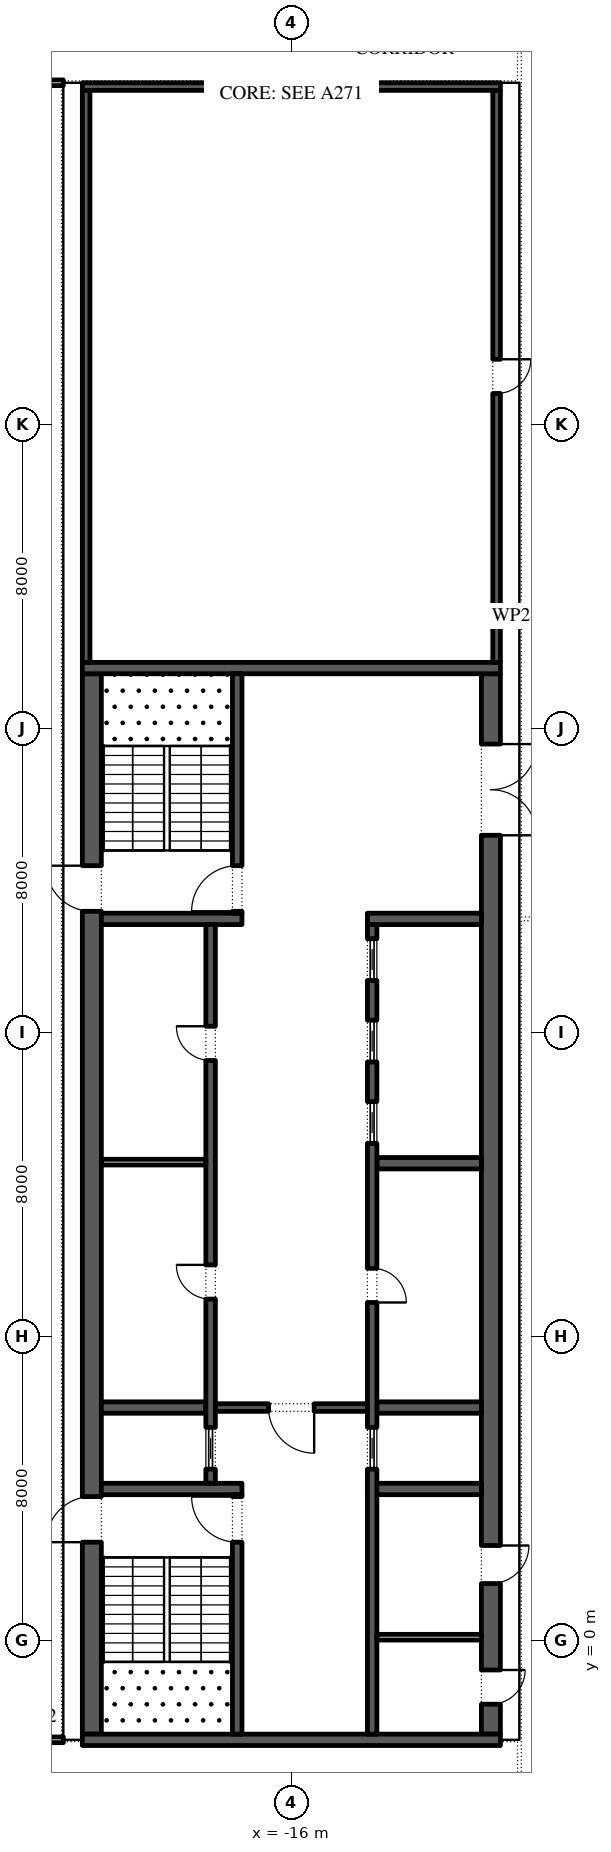
"""IFC4 building model, lengths in metres.
Left out: names, types, materials, properties, quantities, classifications, styles, units other than length and angle.
Written with IfcOpenShell. Run it as: python <this file> out.ifc"""

import sys

from ifc_helpers import new_model, si_unit, direction, frame, frame_2d, origin, place, context, subcontext, project, spatial, rectangle, extrude, element, fill, save


model = new_model("IFC4")
c1 = context("Model", 3, precision=1e-05, world=origin(), true_north=direction((0.0, 1.0)))
c2 = subcontext(c1, "Body", "Model", "MODEL_VIEW")
j1 = project(units=[si_unit("LENGTHUNIT", "METRE"), si_unit("PLANEANGLEUNIT", "RADIAN")], contexts=[c1])
p1 = place(None, origin())
s1 = spatial("IfcSite", under=j1, at=p1, CompositionType="ELEMENT")
p2 = place(p1, origin())
s2 = spatial("IfcBuilding", under=s1, at=p2, CompositionType="ELEMENT")
p3 = place(p2, frame((0.0, 0.0, 313.2)))
s3 = spatial("IfcBuildingStorey", under=s2, at=p3, CompositionType="ELEMENT", Elevation=313.2)
p4 = place(p3, frame((-21.25, -2.45, 0.0), z_axis=(0.0, 0.0, 1.0), x_axis=(0.0, 1.0, 0.0)))
e1 = element("IfcWall", 1, at=p4, inside=s3, PredefinedType="SHEAR", context=c2, shape_type="SweptSolid", body=[
    extrude(rectangle(XDim=27.9, YDim=0.5, at=frame_2d((13.95, 0.0))), origin(), (0.0, 0.0, 1.0), 4.0),
])
p5 = place(p4, frame((5.05, 0.0, 0.0)))
e2 = element("IfcOpeningElement", 2, at=p5, cuts=e1, PredefinedType="OPENING", context=c2, shape_type="SweptSolid", body=[
    extrude(rectangle(XDim=1.2, YDim=2.1, at=frame_2d((0.6, 1.05))), frame((0.0, 0.26, 0.0), z_axis=(0.0, -1.0, 0.0), x_axis=(1.0, 0.0, 0.0)), (0.0, 0.0, 1.0), 0.52),
])
p6 = place(p4, frame((21.65, 0.0, 0.0)))
e3 = element("IfcOpeningElement", 3, at=p6, cuts=e1, PredefinedType="OPENING", context=c2, shape_type="SweptSolid", body=[
    extrude(rectangle(XDim=1.2, YDim=2.1, at=frame_2d((0.6, 1.05))), frame((0.0, 0.26, 0.0), z_axis=(0.0, -1.0, 0.0), x_axis=(1.0, 0.0, 0.0)), (0.0, 0.0, 1.0), 0.52),
])
p7 = place(p3, frame((-10.75, -2.45, 0.0), z_axis=(0.0, 0.0, 1.0), x_axis=(0.0, 1.0, 0.0)))
e4 = element("IfcWall", 4, at=p7, inside=s3, PredefinedType="SHEAR", context=c2, shape_type="SweptSolid", body=[
    extrude(rectangle(XDim=27.9, YDim=0.5, at=frame_2d((13.95, 0.0))), origin(), (0.0, 0.0, 1.0), 4.0),
])
p8 = place(p7, frame((23.65, 0.0, 0.0)))
e5 = element("IfcOpeningElement", 5, at=p8, cuts=e4, PredefinedType="OPENING", context=c2, shape_type="SweptSolid", body=[
    extrude(rectangle(XDim=2.4, YDim=2.1, at=frame_2d((1.2, 1.05))), frame((0.0, 0.26, 0.0), z_axis=(0.0, -1.0, 0.0), x_axis=(1.0, 0.0, 0.0)), (0.0, 0.0, 1.0), 0.52),
])
p9 = place(p7, frame((0.788, 0.0, 0.0)))
e6 = element("IfcOpeningElement", 6, at=p9, cuts=e4, PredefinedType="OPENING", context=c2, shape_type="SweptSolid", body=[
    extrude(rectangle(XDim=0.9, YDim=2.1, at=frame_2d((0.45, 1.05))), frame((0.0, 0.26, 0.0), z_axis=(0.0, -1.0, 0.0), x_axis=(1.0, 0.0, 0.0)), (0.0, 0.0, 1.0), 0.52),
])
p10 = place(p7, frame((3.962, 0.0, 0.0)))
e7 = element("IfcOpeningElement", 7, at=p10, cuts=e4, PredefinedType="OPENING", context=c2, shape_type="SweptSolid", body=[
    extrude(rectangle(XDim=1.0, YDim=2.1, at=frame_2d((0.5, 1.05))), frame((0.0, 0.26, 0.0), z_axis=(0.0, -1.0, 0.0), x_axis=(1.0, 0.0, 0.0)), (0.0, 0.0, 1.0), 0.52),
])
for number, where, z_axis, x_axis in (
    (8, (-21.5, -2.6, 0.0), (0.0, 0.0, 1.0), (1.0, 0.0, 0.0)),
    (9, (-21.5, 25.6, 0.0), (0.0, 0.0, 1.0), (1.0, 0.0, 0.0)),
):
    element("IfcWall", number, at=place(p3, frame(where, z_axis=z_axis, x_axis=x_axis)), inside=s3, PredefinedType="SHEAR", context=c2, shape_type="SweptSolid", body=[
        extrude(rectangle(XDim=11.0, YDim=0.3, at=frame_2d((5.5, 0.0))), origin(), (0.0, 0.0, 1.0), 4.0),
    ])
p11 = place(p3, frame((-21.0, 4.0, 0.0), z_axis=(0.0, 0.0, 1.0), x_axis=(1.0, 0.0, 0.0)))
e10 = element("IfcWall", 10, at=p11, inside=s3, PredefinedType="SHEAR", context=c2, shape_type="SweptSolid", body=[
    extrude(rectangle(XDim=3.7, YDim=0.3, at=frame_2d((1.85, 0.0))), origin(), (0.0, 0.0, 1.0), 4.0),
])
p12 = place(p3, frame((-17.425, -2.45, 0.0), z_axis=(0.0, 0.0, 1.0), x_axis=(0.0, 1.0, 0.0)))
e11 = element("IfcWall", 11, at=p12, inside=s3, PredefinedType="SHEAR", context=c2, shape_type="SweptSolid", body=[
    extrude(rectangle(XDim=6.3, YDim=0.25, at=frame_2d((3.15, 0.0))), origin(), (0.0, 0.0, 1.0), 4.0),
])
p13 = place(p12, frame((5.05, 0.0, 0.0)))
e12 = element("IfcOpeningElement", 12, at=p13, cuts=e11, PredefinedType="OPENING", context=c2, shape_type="SweptSolid", body=[
    extrude(rectangle(XDim=1.2, YDim=2.1, at=frame_2d((0.6, 1.05))), frame((0.0, 0.135, 0.0), z_axis=(0.0, -1.0, 0.0), x_axis=(1.0, 0.0, 0.0)), (0.0, 0.0, 1.0), 0.27),
])
p14 = place(p3, frame((-21.0, 19.0, 0.0), z_axis=(0.0, 0.0, 1.0), x_axis=(1.0, 0.0, 0.0)))
e13 = element("IfcWall", 13, at=p14, inside=s3, PredefinedType="SHEAR", context=c2, shape_type="SweptSolid", body=[
    extrude(rectangle(XDim=3.7, YDim=0.3, at=frame_2d((1.85, 0.0))), origin(), (0.0, 0.0, 1.0), 4.0),
])
p15 = place(p3, frame((-17.425, 19.15, 0.0), z_axis=(0.0, 0.0, 1.0), x_axis=(0.0, 1.0, 0.0)))
e14 = element("IfcWall", 14, at=p15, inside=s3, PredefinedType="SHEAR", context=c2, shape_type="SweptSolid", body=[
    extrude(rectangle(XDim=6.3, YDim=0.25, at=frame_2d((3.15, 0.0))), origin(), (0.0, 0.0, 1.0), 4.0),
])
p16 = place(p15, frame((0.05, 0.0, 0.0)))
e15 = element("IfcOpeningElement", 15, at=p16, cuts=e14, PredefinedType="OPENING", context=c2, shape_type="SweptSolid", body=[
    extrude(rectangle(XDim=1.2, YDim=2.1, at=frame_2d((0.6, 1.05))), frame((0.0, 0.135, 0.0), z_axis=(0.0, -1.0, 0.0), x_axis=(1.0, 0.0, 0.0)), (0.0, 0.0, 1.0), 0.27),
])
p17 = place(p3, frame((-21.0, 6.143, 0.0), z_axis=(0.0, 0.0, 1.0), x_axis=(1.0, 0.0, 0.0)))
e16 = element("IfcWall", 16, at=p17, inside=s3, PredefinedType="SHEAR", context=c2, shape_type="SweptSolid", body=[
    extrude(rectangle(XDim=2.75, YDim=0.3, at=frame_2d((1.375, 0.0))), origin(), (0.0, 0.0, 1.0), 4.0),
])
p18 = place(p3, frame((-18.125, 4.15, 0.0), z_axis=(0.0, 0.0, 1.0), x_axis=(0.0, 1.0, 0.0)))
e17 = element("IfcWall", 17, at=p18, inside=s3, PredefinedType="SHEAR", context=c2, shape_type="SweptSolid", body=[
    extrude(rectangle(XDim=14.7, YDim=0.25, at=frame_2d((7.35, 0.0))), origin(), (0.0, 0.0, 1.0), 4.0),
])
p19 = place(p18, frame((4.846, 0.0, 0.0)))
e18 = element("IfcOpeningElement", 18, at=p19, cuts=e17, PredefinedType="OPENING", context=c2, shape_type="SweptSolid", body=[
    extrude(rectangle(XDim=0.9, YDim=2.1, at=frame_2d((0.45, 1.05))), frame((0.0, 0.135, 0.0), z_axis=(0.0, -1.0, 0.0), x_axis=(1.0, 0.0, 0.0)), (0.0, 0.0, 1.0), 0.27),
])
p20 = place(p18, frame((11.125, 0.0, 0.0)))
e19 = element("IfcOpeningElement", 19, at=p20, cuts=e17, PredefinedType="OPENING", context=c2, shape_type="SweptSolid", body=[
    extrude(rectangle(XDim=0.9, YDim=2.1, at=frame_2d((0.45, 1.05))), frame((0.0, 0.135, 0.0), z_axis=(0.0, -1.0, 0.0), x_axis=(1.0, 0.0, 0.0)), (0.0, 0.0, 1.0), 0.27),
])
p21 = place(p18, frame((0.371, 0.0, 0.0)))
e20 = element("IfcOpeningElement", 20, at=p21, cuts=e17, PredefinedType="OPENING", context=c2, shape_type="SweptSolid", body=[
    extrude(rectangle(XDim=1.1, YDim=2.1, at=frame_2d((0.55, 1.05))), frame((0.0, 0.135, 0.0), z_axis=(0.0, -1.0, 0.0), x_axis=(1.0, 0.0, 0.0)), (0.0, 0.0, 1.0), 0.27),
])
p22 = place(p3, frame((-21.0, 12.6, 0.0), z_axis=(0.0, 0.0, 1.0), x_axis=(1.0, 0.0, 0.0)))
e21 = element("IfcWall", 21, at=p22, inside=s3, PredefinedType="PARTITIONING", context=c2, shape_type="SweptSolid", body=[
    extrude(rectangle(XDim=2.75, YDim=0.15, at=frame_2d((1.375, 0.0))), origin(), (0.0, 0.0, 1.0), 4.0),
])
p23 = place(p3, frame((-14.0, 4.0, 0.0), z_axis=(0.0, 0.0, 1.0), x_axis=(1.0, 0.0, 0.0)))
e22 = element("IfcWall", 22, at=p23, inside=s3, PredefinedType="SHEAR", context=c2, shape_type="SweptSolid", body=[
    extrude(rectangle(XDim=3.0, YDim=0.3, at=frame_2d((1.5, 0.0))), origin(), (0.0, 0.0, 1.0), 4.0),
])
for number, where, z_axis, x_axis in (
    (23, (-13.75, 6.143, 0.0), (0.0, 0.0, 1.0), (1.0, 0.0, 0.0)),
    (24, (-13.75, 12.571, 0.0), (0.0, 0.0, 1.0), (1.0, 0.0, 0.0)),
):
    element("IfcWall", number, at=place(p3, frame(where, z_axis=z_axis, x_axis=x_axis)), inside=s3, PredefinedType="SHEAR", context=c2, shape_type="SweptSolid", body=[
        extrude(rectangle(XDim=2.75, YDim=0.3, at=frame_2d((1.375, 0.0))), origin(), (0.0, 0.0, 1.0), 4.0),
    ])
p24 = place(p3, frame((-14.0, 19.0, 0.0), z_axis=(0.0, 0.0, 1.0), x_axis=(1.0, 0.0, 0.0)))
e25 = element("IfcWall", 25, at=p24, inside=s3, PredefinedType="SHEAR", context=c2, shape_type="SweptSolid", body=[
    extrude(rectangle(XDim=3.0, YDim=0.3, at=frame_2d((1.5, 0.0))), origin(), (0.0, 0.0, 1.0), 4.0),
])
p25 = place(p3, frame((-13.875, -2.45, 0.0), z_axis=(0.0, 0.0, 1.0), x_axis=(0.0, 1.0, 0.0)))
e26 = element("IfcWall", 26, at=p25, inside=s3, PredefinedType="SHEAR", context=c2, shape_type="SweptSolid", body=[
    extrude(rectangle(XDim=21.3, YDim=0.25, at=frame_2d((10.65, 0.0))), origin(), (0.0, 0.0, 1.0), 4.0),
])
p26 = place(p25, frame((11.357, 0.0, 0.0)))
e27 = element("IfcOpeningElement", 27, at=p26, cuts=e26, PredefinedType="OPENING", context=c2, shape_type="SweptSolid", body=[
    extrude(rectangle(XDim=0.9, YDim=2.1, at=frame_2d((0.45, 1.05))), frame((0.0, 0.135, 0.0), z_axis=(0.0, -1.0, 0.0), x_axis=(1.0, 0.0, 0.0)), (0.0, 0.0, 1.0), 0.27),
])
p27 = place(p25, frame((6.971, 0.0, 0.0)))
e28 = element("IfcOpeningElement", 28, at=p27, cuts=e26, PredefinedType="OPENING", context=c2, shape_type="SweptSolid", body=[
    extrude(rectangle(XDim=1.1, YDim=2.1, at=frame_2d((0.55, 1.05))), frame((0.0, 0.135, 0.0), z_axis=(0.0, -1.0, 0.0), x_axis=(1.0, 0.0, 0.0)), (0.0, 0.0, 1.0), 0.27),
])
p28 = place(p25, frame((15.543, 0.0, 0.0)))
e29 = element("IfcOpeningElement", 29, at=p28, cuts=e26, PredefinedType="OPENING", context=c2, shape_type="SweptSolid", body=[
    extrude(rectangle(XDim=1.1, YDim=2.1, at=frame_2d((0.55, 1.05))), frame((0.0, 0.135, 0.0), z_axis=(0.0, -1.0, 0.0), x_axis=(1.0, 0.0, 0.0)), (0.0, 0.0, 1.0), 0.27),
])
p29 = place(p25, frame((17.686, 0.0, 0.0)))
e30 = element("IfcOpeningElement", 30, at=p29, cuts=e26, PredefinedType="OPENING", context=c2, shape_type="SweptSolid", body=[
    extrude(rectangle(XDim=1.1, YDim=2.1, at=frame_2d((0.55, 1.05))), frame((0.0, 0.135, 0.0), z_axis=(0.0, -1.0, 0.0), x_axis=(1.0, 0.0, 0.0)), (0.0, 0.0, 1.0), 0.27),
])
p30 = place(p25, frame((19.829, 0.0, 0.0)))
e31 = element("IfcOpeningElement", 31, at=p30, cuts=e26, PredefinedType="OPENING", context=c2, shape_type="SweptSolid", body=[
    extrude(rectangle(XDim=1.1, YDim=2.1, at=frame_2d((0.55, 1.05))), frame((0.0, 0.135, 0.0), z_axis=(0.0, -1.0, 0.0), x_axis=(1.0, 0.0, 0.0)), (0.0, 0.0, 1.0), 0.27),
])
p31 = place(p3, frame((-18.0, 6.143, 0.0), z_axis=(0.0, 0.0, 1.0), x_axis=(1.0, 0.0, 0.0)))
e32 = element("IfcWall", 32, at=p31, inside=s3, PredefinedType="SHEAR", context=c2, shape_type="SweptSolid", body=[
    extrude(rectangle(XDim=4.0, YDim=0.2, at=frame_2d((2.0, 0.0))), origin(), (0.0, 0.0, 1.0), 4.0),
])
p32 = place(p31, frame((1.4, 0.0, 0.0)))
e33 = element("IfcOpeningElement", 33, at=p32, cuts=e32, PredefinedType="OPENING", context=c2, shape_type="SweptSolid", body=[
    extrude(rectangle(XDim=1.2, YDim=2.1, at=frame_2d((0.6, 1.05))), frame((0.0, 0.11, 0.0), z_axis=(0.0, -1.0, 0.0), x_axis=(1.0, 0.0, 0.0)), (0.0, 0.0, 1.0), 0.22),
])
p33 = place(p3, frame((-13.75, 0.1, 0.0), z_axis=(0.0, 0.0, 1.0), x_axis=(1.0, 0.0, 0.0)))
e34 = element("IfcWall", 34, at=p33, inside=s3, PredefinedType="PARTITIONING", context=c2, shape_type="SweptSolid", body=[
    extrude(rectangle(XDim=2.75, YDim=0.15, at=frame_2d((1.375, 0.0))), origin(), (0.0, 0.0, 1.0), 4.0),
])
p34 = place(p3, frame((-21.4, 25.75, 0.0), z_axis=(0.0, 0.0, 1.0), x_axis=(0.0, 1.0, 0.0)))
e35 = element("IfcWall", 35, at=p34, inside=s3, PredefinedType="SHEAR", context=c2, shape_type="SweptSolid", body=[
    extrude(rectangle(XDim=15.05, YDim=0.2, at=frame_2d((7.525, 0.0))), origin(), (0.0, 0.0, 1.0), 4.0),
])
p35 = place(p3, frame((-10.6, 25.75, 0.0), z_axis=(0.0, 0.0, 1.0), x_axis=(0.0, 1.0, 0.0)))
e36 = element("IfcWall", 36, at=p35, inside=s3, PredefinedType="SHEAR", context=c2, shape_type="SweptSolid", body=[
    extrude(rectangle(XDim=15.05, YDim=0.2, at=frame_2d((7.525, 0.0))), origin(), (0.0, 0.0, 1.0), 4.0),
])
p36 = place(p35, frame((7.075, 0.0, 0.0)))
e37 = element("IfcOpeningElement", 37, at=p36, cuts=e36, PredefinedType="OPENING", context=c2, shape_type="SweptSolid", body=[
    extrude(rectangle(XDim=0.9, YDim=2.1, at=frame_2d((0.45, 1.05))), frame((0.0, 0.11, 0.0), z_axis=(0.0, -1.0, 0.0), x_axis=(1.0, 0.0, 0.0)), (0.0, 0.0, 1.0), 0.22),
])
p37 = place(p3, frame((-21.5, 40.9, 0.0), z_axis=(0.0, 0.0, 1.0), x_axis=(1.0, 0.0, 0.0)))
e38 = element("IfcWall", 38, at=p37, inside=s3, PredefinedType="SHEAR", context=c2, shape_type="SweptSolid", body=[
    extrude(rectangle(XDim=11.0, YDim=0.2, at=frame_2d((5.5, 0.0))), origin(), (0.0, 0.0, 1.0), 4.0),
])
p38 = place(p3, frame((-24.25, -2.6, 0.0), z_axis=(0.0, 0.0, 1.0), x_axis=(1.0, 0.0, 0.0)))
e39 = element("IfcWall", 39, at=p38, inside=s3, PredefinedType="PARTITIONING", context=c2, shape_type="SweptSolid", body=[
    extrude(rectangle(XDim=2.25, YDim=0.15, at=frame_2d((1.125, 0.0))), origin(), (0.0, 0.0, 1.0), 4.0),
])
p39 = place(p3, frame((-22.0, 41.0, 0.0), z_axis=(0.0, 0.0, 1.0), x_axis=(-1.0, 0.0, 0.0)))
e40 = element("IfcWall", 40, at=p39, inside=s3, PredefinedType="PARTITIONING", context=c2, shape_type="SweptSolid", body=[
    extrude(rectangle(XDim=4.05, YDim=0.15, at=frame_2d((2.025, 0.0))), origin(), (0.0, 0.0, 1.0), 4.0),
])
p40 = place(p39, frame((1.1, 0.0, 0.0)))
e41 = element("IfcOpeningElement", 41, at=p40, cuts=e40, PredefinedType="OPENING", context=c2, shape_type="SweptSolid", body=[
    extrude(rectangle(XDim=1.0, YDim=2.1, at=frame_2d((0.5, 1.05))), frame((0.0, 0.085, 0.0), z_axis=(0.0, -1.0, 0.0), x_axis=(1.0, 0.0, 0.0)), (0.0, 0.0, 1.0), 0.17),
])
p41 = place(p19, origin())
e42 = element("IfcDoor", 42, at=p41, inside=s3, OperationType="SINGLE_SWING_LEFT", PredefinedType="DOOR", context=c2, shape_type="SweptSolid", body=[
    extrude(rectangle(XDim=0.9, YDim=2.1, at=frame_2d((0.45, 1.05))), frame((0.0, 0.125, 0.0), z_axis=(0.0, -1.0, 0.0), x_axis=(1.0, 0.0, 0.0)), (0.0, 0.0, 1.0), 0.05),
])
fill(e18, e42)
p42 = place(p20, origin())
e43 = element("IfcDoor", 43, at=p42, inside=s3, OperationType="SINGLE_SWING_LEFT", PredefinedType="DOOR", context=c2, shape_type="SweptSolid", body=[
    extrude(rectangle(XDim=0.9, YDim=2.1, at=frame_2d((0.45, 1.05))), frame((0.0, 0.125, 0.0), z_axis=(0.0, -1.0, 0.0), x_axis=(1.0, 0.0, 0.0)), (0.0, 0.0, 1.0), 0.05),
])
fill(e19, e43)
p43 = place(p21, origin())
e44 = element("IfcDoor", 44, at=p43, inside=s3, OperationType="SLIDING_TO_LEFT", PredefinedType="DOOR", context=c2, shape_type="SweptSolid", body=[
    extrude(rectangle(XDim=1.1, YDim=2.1, at=frame_2d((0.55, 1.05))), frame((0.0, 0.025, 0.0), z_axis=(0.0, -1.0, 0.0), x_axis=(1.0, 0.0, 0.0)), (0.0, 0.0, 1.0), 0.05),
])
fill(e20, e44)
p44 = place(p26, frame((0.9, -0.2, 0.0), z_axis=(0.0, 0.0, 1.0), x_axis=(-1.0, 0.0, 0.0)))
e45 = element("IfcDoor", 45, at=p44, inside=s3, OperationType="SINGLE_SWING_LEFT", PredefinedType="DOOR", context=c2, shape_type="SweptSolid", body=[
    extrude(rectangle(XDim=0.9, YDim=2.1, at=frame_2d((0.45, 1.05))), frame((0.0, -0.075, 0.0), z_axis=(0.0, -1.0, 0.0), x_axis=(1.0, 0.0, 0.0)), (0.0, 0.0, 1.0), 0.05),
])
fill(e27, e45)
p45 = place(p27, origin())
e46 = element("IfcDoor", 46, at=p45, inside=s3, OperationType="SLIDING_TO_LEFT", PredefinedType="DOOR", context=c2, shape_type="SweptSolid", body=[
    extrude(rectangle(XDim=1.1, YDim=2.1, at=frame_2d((0.55, 1.05))), frame((0.0, 0.025, 0.0), z_axis=(0.0, -1.0, 0.0), x_axis=(1.0, 0.0, 0.0)), (0.0, 0.0, 1.0), 0.05),
])
fill(e28, e46)
p46 = place(p28, origin())
e47 = element("IfcDoor", 47, at=p46, inside=s3, OperationType="SLIDING_TO_LEFT", PredefinedType="DOOR", context=c2, shape_type="SweptSolid", body=[
    extrude(rectangle(XDim=1.1, YDim=2.1, at=frame_2d((0.55, 1.05))), frame((0.0, 0.025, 0.0), z_axis=(0.0, -1.0, 0.0), x_axis=(1.0, 0.0, 0.0)), (0.0, 0.0, 1.0), 0.05),
])
fill(e29, e47)
p47 = place(p29, origin())
e48 = element("IfcDoor", 48, at=p47, inside=s3, OperationType="SLIDING_TO_LEFT", PredefinedType="DOOR", context=c2, shape_type="SweptSolid", body=[
    extrude(rectangle(XDim=1.1, YDim=2.1, at=frame_2d((0.55, 1.05))), frame((0.0, 0.025, 0.0), z_axis=(0.0, -1.0, 0.0), x_axis=(1.0, 0.0, 0.0)), (0.0, 0.0, 1.0), 0.05),
])
fill(e30, e48)
p48 = place(p30, origin())
e49 = element("IfcDoor", 49, at=p48, inside=s3, OperationType="SLIDING_TO_LEFT", PredefinedType="DOOR", context=c2, shape_type="SweptSolid", body=[
    extrude(rectangle(XDim=1.1, YDim=2.1, at=frame_2d((0.55, 1.05))), frame((0.0, 0.025, 0.0), z_axis=(0.0, -1.0, 0.0), x_axis=(1.0, 0.0, 0.0)), (0.0, 0.0, 1.0), 0.05),
])
fill(e31, e49)
p49 = place(p32, frame((1.2, 0.0, 0.0), z_axis=(0.0, 0.0, 1.0), x_axis=(-1.0, 0.0, 0.0)))
e50 = element("IfcDoor", 50, at=p49, inside=s3, OperationType="SINGLE_SWING_RIGHT", PredefinedType="DOOR", context=c2, shape_type="SweptSolid", body=[
    extrude(rectangle(XDim=1.2, YDim=2.1, at=frame_2d((0.6, 1.05))), frame((0.0, 0.025, 0.0), z_axis=(0.0, -1.0, 0.0), x_axis=(1.0, 0.0, 0.0)), (0.0, 0.0, 1.0), 0.05),
])
fill(e33, e50)
p50 = place(p8, frame((2.4, 0.0, 0.0), z_axis=(0.0, 0.0, 1.0), x_axis=(-1.0, 0.0, 0.0)))
e51 = element("IfcDoor", 51, at=p50, inside=s3, OperationType="DOUBLE_DOOR_SINGLE_SWING", PredefinedType="DOOR", context=c2, shape_type="SweptSolid", body=[
    extrude(rectangle(XDim=2.4, YDim=2.1, at=frame_2d((1.2, 1.05))), frame((0.0, 0.025, 0.0), z_axis=(0.0, -1.0, 0.0), x_axis=(1.0, 0.0, 0.0)), (0.0, 0.0, 1.0), 0.05),
])
fill(e5, e51)
p51 = place(p13, origin())
e52 = element("IfcDoor", 52, at=p51, inside=s3, OperationType="SINGLE_SWING_LEFT", PredefinedType="DOOR", context=c2, shape_type="SweptSolid", body=[
    extrude(rectangle(XDim=1.2, YDim=2.1, at=frame_2d((0.6, 1.05))), frame((0.0, 0.025, 0.0), z_axis=(0.0, -1.0, 0.0), x_axis=(1.0, 0.0, 0.0)), (0.0, 0.0, 1.0), 0.05),
])
fill(e12, e52)
p52 = place(p5, origin())
e53 = element("IfcDoor", 53, at=p52, inside=s3, OperationType="SINGLE_SWING_RIGHT", PredefinedType="DOOR", context=c2, shape_type="SweptSolid", body=[
    extrude(rectangle(XDim=1.2, YDim=2.1, at=frame_2d((0.6, 1.05))), frame((0.0, 0.025, 0.0), z_axis=(0.0, -1.0, 0.0), x_axis=(1.0, 0.0, 0.0)), (0.0, 0.0, 1.0), 0.05),
])
fill(e2, e53)
p53 = place(p16, origin())
e54 = element("IfcDoor", 54, at=p53, inside=s3, OperationType="SINGLE_SWING_RIGHT", PredefinedType="DOOR", context=c2, shape_type="SweptSolid", body=[
    extrude(rectangle(XDim=1.2, YDim=2.1, at=frame_2d((0.6, 1.05))), frame((0.0, 0.025, 0.0), z_axis=(0.0, -1.0, 0.0), x_axis=(1.0, 0.0, 0.0)), (0.0, 0.0, 1.0), 0.05),
])
fill(e15, e54)
p54 = place(p6, origin())
e55 = element("IfcDoor", 55, at=p54, inside=s3, OperationType="SINGLE_SWING_LEFT", PredefinedType="DOOR", context=c2, shape_type="SweptSolid", body=[
    extrude(rectangle(XDim=1.2, YDim=2.1, at=frame_2d((0.6, 1.05))), frame((0.0, 0.025, 0.0), z_axis=(0.0, -1.0, 0.0), x_axis=(1.0, 0.0, 0.0)), (0.0, 0.0, 1.0), 0.05),
])
fill(e3, e55)
p55 = place(p9, frame((0.9, 0.45, 0.0), z_axis=(0.0, 0.0, 1.0), x_axis=(-1.0, 0.0, 0.0)))
e56 = element("IfcDoor", 56, at=p55, inside=s3, OperationType="SINGLE_SWING_RIGHT", PredefinedType="DOOR", context=c2, shape_type="SweptSolid", body=[
    extrude(rectangle(XDim=0.9, YDim=2.1, at=frame_2d((0.45, 1.05))), frame((0.0, 0.25, 0.0), z_axis=(0.0, -1.0, 0.0), x_axis=(1.0, 0.0, 0.0)), (0.0, 0.0, 1.0), 0.05),
])
fill(e6, e56)
p56 = place(p10, frame((1.0, 0.45, 0.0), z_axis=(0.0, 0.0, 1.0), x_axis=(-1.0, 0.0, 0.0)))
e57 = element("IfcDoor", 57, at=p56, inside=s3, OperationType="SINGLE_SWING_RIGHT", PredefinedType="DOOR", context=c2, shape_type="SweptSolid", body=[
    extrude(rectangle(XDim=1.0, YDim=2.1, at=frame_2d((0.5, 1.05))), frame((0.0, 0.25, 0.0), z_axis=(0.0, -1.0, 0.0), x_axis=(1.0, 0.0, 0.0)), (0.0, 0.0, 1.0), 0.05),
])
fill(e7, e57)
p57 = place(p36, frame((0.9, 0.15, 0.0), z_axis=(0.0, 0.0, 1.0), x_axis=(-1.0, 0.0, 0.0)))
e58 = element("IfcDoor", 58, at=p57, inside=s3, OperationType="SINGLE_SWING_RIGHT", PredefinedType="DOOR", context=c2, shape_type="SweptSolid", body=[
    extrude(rectangle(XDim=0.9, YDim=2.1, at=frame_2d((0.45, 1.05))), frame((0.0, 0.1, 0.0), z_axis=(0.0, -1.0, 0.0), x_axis=(1.0, 0.0, 0.0)), (0.0, 0.0, 1.0), 0.05),
])
fill(e37, e58)
save(model, sys.argv[1])
